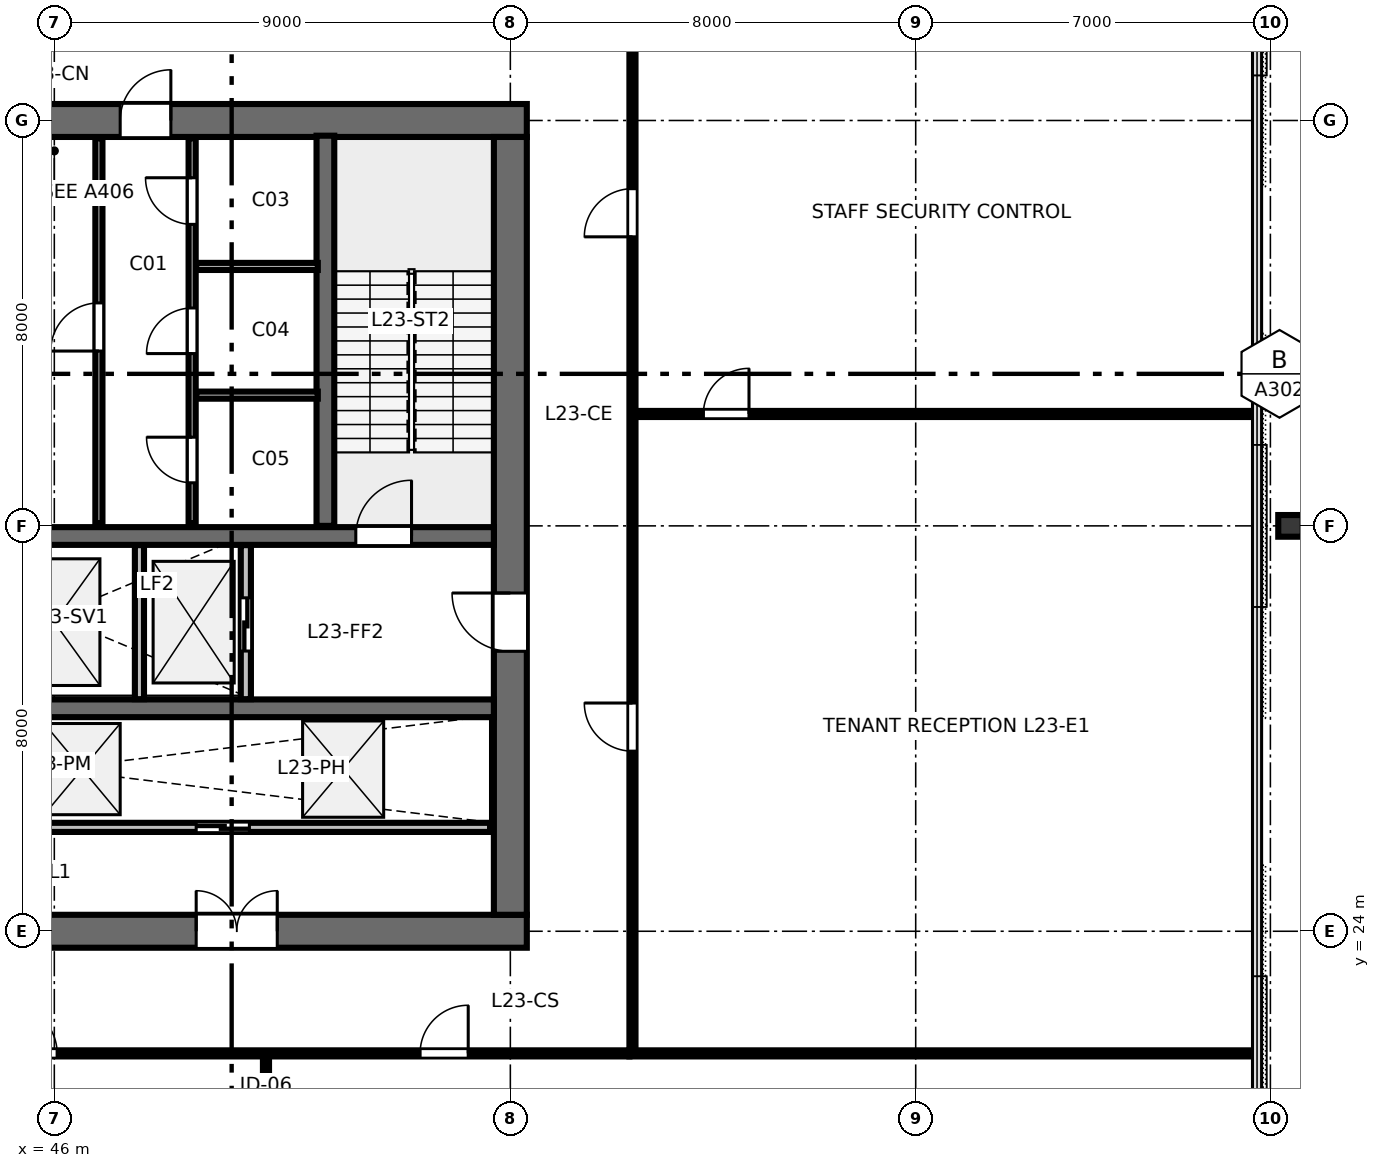
"""IFC4 building model, lengths in metres.
Left out: names, types, materials, properties, quantities, classifications, styles, units other than length and angle.
Written with IfcOpenShell. Run it as: python <this file> out.ifc"""

import sys

from ifc_helpers import new_model, si_unit, direction, frame, frame_2d, origin, origin_2d, place, context, subcontext, project, spatial, rectangle, i_section, extrude, element, fill, save


model = new_model("IFC4")
c1 = context("Model", 3, precision=1e-05, world=origin(), true_north=direction((0.0, 1.0)))
c2 = subcontext(c1, "Body", "Model", "MODEL_VIEW")
j1 = project(units=[si_unit("LENGTHUNIT", "METRE"), si_unit("PLANEANGLEUNIT", "RADIAN")], contexts=[c1])
p1 = place(None, origin())
s1 = spatial("IfcSite", under=j1, at=p1, CompositionType="ELEMENT")
p2 = place(p1, origin())
s2 = spatial("IfcBuilding", under=s1, at=p2, CompositionType="ELEMENT")
p3 = place(p2, frame((0.0, 0.0, 90.4)))
s3 = spatial("IfcBuildingStorey", under=s2, at=p3, CompositionType="ELEMENT", Elevation=90.4)
p4 = place(p3, frame((36.675, 24.0, 0.0), z_axis=(0.0, 0.0, 1.0), x_axis=(1.0, 0.0, 0.0)))
e1 = element("IfcWall", 1, at=p4, inside=s3, PredefinedType="SHEAR", context=c2, shape_type="SweptSolid", body=[
    extrude(rectangle(XDim=18.65, YDim=0.65, at=frame_2d((9.325, 0.0))), origin(), (0.0, 0.0, 1.0), 4.56),
])
p5 = place(p4, frame((5.725, 0.0, 0.0)))
e2 = element("IfcOpeningElement", 2, at=p5, cuts=e1, PredefinedType="OPENING", context=c2, shape_type="SweptSolid", body=[
    extrude(rectangle(XDim=1.6, YDim=2.15, at=frame_2d((0.8, 1.075))), frame((0.0, 0.335, 0.0), z_axis=(0.0, -1.0, 0.0), x_axis=(1.0, 0.0, 0.0)), (0.0, 0.0, 1.0), 0.67),
])
p6 = place(p4, frame((12.125, 0.0, 0.0)))
e3 = element("IfcOpeningElement", 3, at=p6, cuts=e1, PredefinedType="OPENING", context=c2, shape_type="SweptSolid", body=[
    extrude(rectangle(XDim=1.6, YDim=2.15, at=frame_2d((0.8, 1.075))), frame((0.0, 0.335, 0.0), z_axis=(0.0, -1.0, 0.0), x_axis=(1.0, 0.0, 0.0)), (0.0, 0.0, 1.0), 0.67),
])
p7 = place(p3, frame((36.675, 40.0, 0.0), z_axis=(0.0, 0.0, 1.0), x_axis=(1.0, 0.0, 0.0)))
e4 = element("IfcWall", 4, at=p7, inside=s3, PredefinedType="SHEAR", context=c2, shape_type="SweptSolid", body=[
    extrude(rectangle(XDim=18.65, YDim=0.65, at=frame_2d((9.325, 0.0))), origin(), (0.0, 0.0, 1.0), 4.56),
])
p8 = place(p7, frame((10.625, 0.0, 0.0)))
e5 = element("IfcOpeningElement", 5, at=p8, cuts=e4, PredefinedType="OPENING", context=c2, shape_type="SweptSolid", body=[
    extrude(rectangle(XDim=1.0, YDim=2.15, at=frame_2d((0.5, 1.075))), frame((0.0, 0.335, 0.0), z_axis=(0.0, -1.0, 0.0), x_axis=(1.0, 0.0, 0.0)), (0.0, 0.0, 1.0), 0.67),
])
p9 = place(p3, frame((55.0, 24.325, 0.0), z_axis=(0.0, 0.0, 1.0), x_axis=(0.0, 1.0, 0.0)))
e6 = element("IfcWall", 6, at=p9, inside=s3, PredefinedType="SHEAR", context=c2, shape_type="SweptSolid", body=[
    extrude(rectangle(XDim=15.35, YDim=0.65, at=frame_2d((7.675, 0.0))), origin(), (0.0, 0.0, 1.0), 4.56),
])
p10 = place(p9, frame((5.2, 0.0, 0.0)))
e7 = element("IfcOpeningElement", 7, at=p10, cuts=e6, PredefinedType="OPENING", context=c2, shape_type="SweptSolid", body=[
    extrude(rectangle(XDim=1.15, YDim=2.15, at=frame_2d((0.575, 1.075))), frame((0.0, 0.335, 0.0), z_axis=(0.0, -1.0, 0.0), x_axis=(1.0, 0.0, 0.0)), (0.0, 0.0, 1.0), 0.67),
])
p11 = place(p3, frame((37.325, 31.8, 0.0), z_axis=(0.0, 0.0, 1.0), x_axis=(1.0, 0.0, 0.0)))
e8 = element("IfcWall", 8, at=p11, inside=s3, PredefinedType="SHEAR", context=c2, shape_type="SweptSolid", body=[
    extrude(rectangle(XDim=17.35, YDim=0.35, at=frame_2d((8.675, 0.0))), origin(), (0.0, 0.0, 1.0), 4.56),
])
p12 = place(p11, frame((0.725, 0.0, 0.0)))
e9 = element("IfcOpeningElement", 9, at=p12, cuts=e8, PredefinedType="OPENING", context=c2, shape_type="SweptSolid", body=[
    extrude(rectangle(XDim=1.1, YDim=2.15, at=frame_2d((0.55, 1.075))), frame((0.0, 0.185, 0.0), z_axis=(0.0, -1.0, 0.0), x_axis=(1.0, 0.0, 0.0)), (0.0, 0.0, 1.0), 0.37),
])
p13 = place(p11, frame((14.625, 0.0, 0.0)))
e10 = element("IfcOpeningElement", 10, at=p13, cuts=e8, PredefinedType="OPENING", context=c2, shape_type="SweptSolid", body=[
    extrude(rectangle(XDim=1.1, YDim=2.15, at=frame_2d((0.55, 1.075))), frame((0.0, 0.185, 0.0), z_axis=(0.0, -1.0, 0.0), x_axis=(1.0, 0.0, 0.0)), (0.0, 0.0, 1.0), 0.37),
])
p14 = place(p3, frame((37.325, 28.4, 0.0), z_axis=(0.0, 0.0, 1.0), x_axis=(1.0, 0.0, 0.0)))
e11 = element("IfcWall", 11, at=p14, inside=s3, PredefinedType="SHEAR", context=c2, shape_type="SweptSolid", body=[
    extrude(rectangle(XDim=17.35, YDim=0.35, at=frame_2d((8.675, 0.0))), origin(), (0.0, 0.0, 1.0), 4.56),
])
p15 = place(p3, frame((70.397, 32.0, 0.0), z_axis=(-0.047509227082, 0.0, 0.998870799124), x_axis=(0.998870799124, 0.0, 0.047509227082)))
e12 = element("IfcColumn", 12, at=p15, inside=s3, PredefinedType="COLUMN", context=c2, shape_type="SweptSolid", body=[
    extrude(i_section(OverallWidth=0.428, OverallDepth=0.483, WebThickness=0.051, FlangeThickness=0.082, FilletRadius=0.025, at=origin_2d()), origin(), (0.0, 0.0, 1.0), 4.563),
])
p16 = place(p3, frame((51.35, 32.0, 0.0), z_axis=(0.0, 0.0, 1.0), x_axis=(0.0, 1.0, 0.0)))
e13 = element("IfcWall", 13, at=p16, inside=s3, PredefinedType="SHEAR", context=c2, shape_type="SweptSolid", body=[
    extrude(rectangle(XDim=7.7, YDim=0.35, at=frame_2d((3.85, 0.0))), origin(), (0.0, 0.0, 1.0), 4.8),
])
p17 = place(p3, frame((46.88, 32.05, 0.0), z_axis=(0.0, 0.0, 1.0), x_axis=(0.0, 1.0, 0.0)))
e14 = element("IfcWall", 14, at=p17, inside=s3, PredefinedType="PARTITIONING", context=c2, shape_type="SweptSolid", body=[
    extrude(rectangle(XDim=7.6, YDim=0.14, at=frame_2d((3.8, 0.0))), origin(), (0.0, 0.0, 1.0), 4.56),
])
p18 = place(p17, frame((3.4, 0.0, 0.0)))
e15 = element("IfcOpeningElement", 15, at=p18, cuts=e14, PredefinedType="OPENING", context=c2, shape_type="SweptSolid", body=[
    extrude(rectangle(XDim=0.95, YDim=2.15, at=frame_2d((0.475, 1.075))), frame((0.0, 0.08, 0.0), z_axis=(0.0, -1.0, 0.0), x_axis=(1.0, 0.0, 0.0)), (0.0, 0.0, 1.0), 0.16),
])
p19 = place(p3, frame((48.72, 32.05, 0.0), z_axis=(0.0, 0.0, 1.0), x_axis=(0.0, 1.0, 0.0)))
e16 = element("IfcWall", 16, at=p19, inside=s3, PredefinedType="PARTITIONING", context=c2, shape_type="SweptSolid", body=[
    extrude(rectangle(XDim=7.6, YDim=0.14, at=frame_2d((3.8, 0.0))), origin(), (0.0, 0.0, 1.0), 4.56),
])
p20 = place(p19, frame((0.8, 0.0, 0.0)))
e17 = element("IfcOpeningElement", 17, at=p20, cuts=e16, PredefinedType="OPENING", context=c2, shape_type="SweptSolid", body=[
    extrude(rectangle(XDim=0.9, YDim=2.15, at=frame_2d((0.45, 1.075))), frame((0.0, 0.08, 0.0), z_axis=(0.0, -1.0, 0.0), x_axis=(1.0, 0.0, 0.0)), (0.0, 0.0, 1.0), 0.16),
])
p21 = place(p19, frame((3.35, 0.0, 0.0)))
e18 = element("IfcOpeningElement", 18, at=p21, cuts=e16, PredefinedType="OPENING", context=c2, shape_type="SweptSolid", body=[
    extrude(rectangle(XDim=0.9, YDim=2.15, at=frame_2d((0.45, 1.075))), frame((0.0, 0.08, 0.0), z_axis=(0.0, -1.0, 0.0), x_axis=(1.0, 0.0, 0.0)), (0.0, 0.0, 1.0), 0.16),
])
p22 = place(p19, frame((5.9, 0.0, 0.0)))
e19 = element("IfcOpeningElement", 19, at=p22, cuts=e16, PredefinedType="OPENING", context=c2, shape_type="SweptSolid", body=[
    extrude(rectangle(XDim=0.92, YDim=2.15, at=frame_2d((0.46, 1.075))), frame((0.0, 0.08, 0.0), z_axis=(0.0, -1.0, 0.0), x_axis=(1.0, 0.0, 0.0)), (0.0, 0.0, 1.0), 0.16),
])
for number, where, z_axis, x_axis in (
    (20, (48.8, 34.58, 0.0), (0.0, 0.0, 1.0), (1.0, 0.0, 0.0)),
    (21, (48.8, 37.12, 0.0), (0.0, 0.0, 1.0), (1.0, 0.0, 0.0)),
):
    element("IfcWall", number, at=place(p3, frame(where, z_axis=z_axis, x_axis=x_axis)), inside=s3, PredefinedType="PARTITIONING", context=c2, shape_type="SweptSolid", body=[
        extrude(rectangle(XDim=2.4, YDim=0.14, at=frame_2d((1.2, 0.0))), origin(), (0.0, 0.0, 1.0), 4.56),
    ])
p23 = place(p3, frame((49.78, 28.58, 0.0), z_axis=(0.0, 0.0, 1.0), x_axis=(0.0, 1.0, 0.0)))
e22 = element("IfcWall", 22, at=p23, inside=s3, PredefinedType="PARTITIONING", context=c2, shape_type="SweptSolid", body=[
    extrude(rectangle(XDim=3.04, YDim=0.2, at=frame_2d((1.52, 0.0))), origin(), (0.0, 0.0, 1.0), 4.56),
])
p24 = place(p23, frame((0.95, 0.0, 0.0)))
e23 = element("IfcOpeningElement", 23, at=p24, cuts=e22, PredefinedType="OPENING", context=c2, shape_type="SweptSolid", body=[
    extrude(rectangle(XDim=1.05, YDim=2.15, at=frame_2d((0.525, 1.075))), frame((0.0, 0.11, 0.0), z_axis=(0.0, -1.0, 0.0), x_axis=(1.0, 0.0, 0.0)), (0.0, 0.0, 1.0), 0.22),
])
p25 = place(p3, frame((47.68, 28.58, 0.0), z_axis=(0.0, 0.0, 1.0), x_axis=(0.0, 1.0, 0.0)))
e24 = element("IfcWall", 24, at=p25, inside=s3, PredefinedType="PARTITIONING", context=c2, shape_type="SweptSolid", body=[
    extrude(rectangle(XDim=3.04, YDim=0.18, at=frame_2d((1.52, 0.0))), origin(), (0.0, 0.0, 1.0), 4.56),
])
p26 = place(p3, frame((37.4, 26.05, 0.0), z_axis=(0.0, 0.0, 1.0), x_axis=(1.0, 0.0, 0.0)))
e25 = element("IfcWall", 25, at=p26, inside=s3, PredefinedType="PARTITIONING", context=c2, shape_type="SweptSolid", body=[
    extrude(rectangle(XDim=17.2, YDim=0.18, at=frame_2d((8.6, 0.0))), origin(), (0.0, 0.0, 1.0), 4.56),
])
p27 = place(p26, frame((1.1, 0.0, 0.0)))
e26 = element("IfcOpeningElement", 26, at=p27, cuts=e25, PredefinedType="OPENING", context=c2, shape_type="SweptSolid", body=[
    extrude(rectangle(XDim=1.05, YDim=2.15, at=frame_2d((0.525, 1.075))), frame((0.0, 0.1, 0.0), z_axis=(0.0, -1.0, 0.0), x_axis=(1.0, 0.0, 0.0)), (0.0, 0.0, 1.0), 0.2),
])
p28 = place(p26, frame((3.0, 0.0, 0.0)))
e27 = element("IfcOpeningElement", 27, at=p28, cuts=e25, PredefinedType="OPENING", context=c2, shape_type="SweptSolid", body=[
    extrude(rectangle(XDim=1.05, YDim=2.15, at=frame_2d((0.525, 1.075))), frame((0.0, 0.1, 0.0), z_axis=(0.0, -1.0, 0.0), x_axis=(1.0, 0.0, 0.0)), (0.0, 0.0, 1.0), 0.2),
])
p29 = place(p26, frame((11.4, 0.0, 0.0)))
e28 = element("IfcOpeningElement", 28, at=p29, cuts=e25, PredefinedType="OPENING", context=c2, shape_type="SweptSolid", body=[
    extrude(rectangle(XDim=1.05, YDim=2.15, at=frame_2d((0.525, 1.075))), frame((0.0, 0.1, 0.0), z_axis=(0.0, -1.0, 0.0), x_axis=(1.0, 0.0, 0.0)), (0.0, 0.0, 1.0), 0.2),
])
p30 = place(p26, frame((6.2, 0.0, 0.0)))
e29 = element("IfcOpeningElement", 29, at=p30, cuts=e25, PredefinedType="OPENING", context=c2, shape_type="SweptSolid", body=[
    extrude(rectangle(XDim=1.05, YDim=2.15, at=frame_2d((0.525, 1.075))), frame((0.0, 0.1, 0.0), z_axis=(0.0, -1.0, 0.0), x_axis=(1.0, 0.0, 0.0)), (0.0, 0.0, 1.0), 0.2),
])
p31 = place(p3, frame((50.177, 21.59, 0.0), z_axis=(0.0, 0.0, 1.0), x_axis=(0.0, -1.0, 0.0)))
e30 = element("IfcWall", 30, at=p31, inside=s3, PredefinedType="PARTITIONING", context=c2, shape_type="SweptSolid", body=[
    extrude(rectangle(XDim=10.493, YDim=0.12, at=frame_2d((5.247, 0.0))), origin(), (0.0, 0.0, 1.0), 3.84),
])
p32 = place(p31, frame((1.4, 0.0, 0.0)))
e31 = element("IfcOpeningElement", 31, at=p32, cuts=e30, PredefinedType="OPENING", context=c2, shape_type="SweptSolid", body=[
    extrude(rectangle(XDim=0.9, YDim=2.15, at=frame_2d((0.45, 1.075))), frame((0.0, 0.07, 0.0), z_axis=(0.0, -1.0, 0.0), x_axis=(1.0, 0.0, 0.0)), (0.0, 0.0, 1.0), 0.14),
])
p33 = place(p3, frame((34.65, 21.59, 0.0), z_axis=(0.0, 0.0, 1.0), x_axis=(1.0, 0.0, 0.0)))
e32 = element("IfcWall", 32, at=p33, inside=s3, PredefinedType="PARTITIONING", context=c2, shape_type="SweptSolid", body=[
    extrude(rectangle(XDim=22.7, YDim=0.12, at=frame_2d((11.35, 0.0))), origin(), (0.0, 0.0, 1.0), 3.84),
])
p34 = place(p33, frame((2.762, 0.0, 0.0)))
e33 = element("IfcOpeningElement", 33, at=p34, cuts=e32, PredefinedType="OPENING", context=c2, shape_type="SweptSolid", body=[
    extrude(rectangle(XDim=0.95, YDim=2.15, at=frame_2d((0.475, 1.075))), frame((0.0, 0.07, 0.0), z_axis=(0.0, -1.0, 0.0), x_axis=(1.0, 0.0, 0.0)), (0.0, 0.0, 1.0), 0.14),
])
p35 = place(p33, frame((10.456, 0.0, 0.0)))
e34 = element("IfcOpeningElement", 34, at=p35, cuts=e32, PredefinedType="OPENING", context=c2, shape_type="SweptSolid", body=[
    extrude(rectangle(XDim=0.95, YDim=2.15, at=frame_2d((0.475, 1.075))), frame((0.0, 0.07, 0.0), z_axis=(0.0, -1.0, 0.0), x_axis=(1.0, 0.0, 0.0)), (0.0, 0.0, 1.0), 0.14),
])
p36 = place(p33, frame((18.569, 0.0, 0.0)))
e35 = element("IfcOpeningElement", 35, at=p36, cuts=e32, PredefinedType="OPENING", context=c2, shape_type="SweptSolid", body=[
    extrude(rectangle(XDim=0.95, YDim=2.15, at=frame_2d((0.475, 1.075))), frame((0.0, 0.07, 0.0), z_axis=(0.0, -1.0, 0.0), x_axis=(1.0, 0.0, 0.0)), (0.0, 0.0, 1.0), 0.14),
])
p37 = place(p3, frame((57.41, 34.208, 0.0), z_axis=(0.0, 0.0, 1.0), x_axis=(1.0, 0.0, 0.0)))
e36 = element("IfcWall", 36, at=p37, inside=s3, PredefinedType="PARTITIONING", context=c2, shape_type="SweptSolid", body=[
    extrude(rectangle(XDim=12.327, YDim=0.12, at=frame_2d((6.164, 0.0))), origin(), (0.0, 0.0, 1.0), 3.84),
])
p38 = place(p37, frame((1.4, 0.0, 0.0)))
e37 = element("IfcOpeningElement", 37, at=p38, cuts=e36, PredefinedType="OPENING", context=c2, shape_type="SweptSolid", body=[
    extrude(rectangle(XDim=0.9, YDim=2.15, at=frame_2d((0.45, 1.075))), frame((0.0, 0.07, 0.0), z_axis=(0.0, -1.0, 0.0), x_axis=(1.0, 0.0, 0.0)), (0.0, 0.0, 1.0), 0.14),
])
p39 = place(p3, frame((57.41, 21.65, 0.0), z_axis=(0.0, 0.0, 1.0), x_axis=(0.0, 1.0, 0.0)))
e38 = element("IfcWall", 38, at=p39, inside=s3, PredefinedType="PARTITIONING", context=c2, shape_type="SweptSolid", body=[
    extrude(rectangle(XDim=20.7, YDim=0.12, at=frame_2d((10.35, 0.0))), origin(), (0.0, 0.0, 1.0), 3.84),
])
p40 = place(p39, frame((5.904, 0.0, 0.0)))
e39 = element("IfcOpeningElement", 39, at=p40, cuts=e38, PredefinedType="OPENING", context=c2, shape_type="SweptSolid", body=[
    extrude(rectangle(XDim=0.95, YDim=2.15, at=frame_2d((0.475, 1.075))), frame((0.0, 0.07, 0.0), z_axis=(0.0, -1.0, 0.0), x_axis=(1.0, 0.0, 0.0)), (0.0, 0.0, 1.0), 0.14),
])
p41 = place(p39, frame((16.054, 0.0, 0.0)))
e40 = element("IfcOpeningElement", 40, at=p41, cuts=e38, PredefinedType="OPENING", context=c2, shape_type="SweptSolid", body=[
    extrude(rectangle(XDim=0.95, YDim=2.15, at=frame_2d((0.475, 1.075))), frame((0.0, 0.07, 0.0), z_axis=(0.0, -1.0, 0.0), x_axis=(1.0, 0.0, 0.0)), (0.0, 0.0, 1.0), 0.14),
])
p42 = place(p3, frame((57.35, 21.59, 0.0), z_axis=(0.0, 0.0, 1.0), x_axis=(1.0, 0.0, 0.0)))
e41 = element("IfcWall", 41, at=p42, inside=s3, PredefinedType="PARTITIONING", context=c2, shape_type="SweptSolid", body=[
    extrude(rectangle(XDim=12.387, YDim=0.12, at=frame_2d((6.193, 0.0))), origin(), (0.0, 0.0, 1.0), 3.84),
])
p43 = place(p13, origin())
e42 = element("IfcDoor", 42, at=p43, inside=s3, OperationType="SINGLE_SWING_RIGHT", PredefinedType="DOOR", context=c2, shape_type="SweptSolid", body=[
    extrude(rectangle(XDim=1.1, YDim=2.15, at=frame_2d((0.55, 1.075))), frame((0.0, 0.025, 0.0), z_axis=(0.0, -1.0, 0.0), x_axis=(1.0, 0.0, 0.0)), (0.0, 0.0, 1.0), 0.05),
])
fill(e10, e42)
p44 = place(p8, origin())
e43 = element("IfcDoor", 43, at=p44, inside=s3, OperationType="SINGLE_SWING_RIGHT", PredefinedType="DOOR", context=c2, shape_type="SweptSolid", body=[
    extrude(rectangle(XDim=1.0, YDim=2.15, at=frame_2d((0.5, 1.075))), frame((0.0, 0.025, 0.0), z_axis=(0.0, -1.0, 0.0), x_axis=(1.0, 0.0, 0.0)), (0.0, 0.0, 1.0), 0.05),
])
fill(e5, e43)
p45 = place(p10, origin())
e44 = element("IfcDoor", 44, at=p45, inside=s3, OperationType="SINGLE_SWING_RIGHT", PredefinedType="DOOR", context=c2, shape_type="SweptSolid", body=[
    extrude(rectangle(XDim=1.15, YDim=2.15, at=frame_2d((0.575, 1.075))), frame((0.0, 0.025, 0.0), z_axis=(0.0, -1.0, 0.0), x_axis=(1.0, 0.0, 0.0)), (0.0, 0.0, 1.0), 0.05),
])
fill(e7, e44)
p46 = place(p6, origin())
e45 = element("IfcDoor", 45, at=p46, inside=s3, OperationType="DOUBLE_DOOR_SINGLE_SWING", PredefinedType="DOOR", context=c2, shape_type="SweptSolid", body=[
    extrude(rectangle(XDim=1.6, YDim=2.15, at=frame_2d((0.8, 1.075))), frame((0.0, 0.025, 0.0), z_axis=(0.0, -1.0, 0.0), x_axis=(1.0, 0.0, 0.0)), (0.0, 0.0, 1.0), 0.05),
])
fill(e3, e45)
p47 = place(p18, origin())
e46 = element("IfcDoor", 46, at=p47, inside=s3, OperationType="SINGLE_SWING_LEFT", PredefinedType="DOOR", context=c2, shape_type="SweptSolid", body=[
    extrude(rectangle(XDim=0.95, YDim=2.15, at=frame_2d((0.475, 1.075))), frame((0.0, 0.025, 0.0), z_axis=(0.0, -1.0, 0.0), x_axis=(1.0, 0.0, 0.0)), (0.0, 0.0, 1.0), 0.05),
])
fill(e15, e46)
p48 = place(p20, origin())
e47 = element("IfcDoor", 47, at=p48, inside=s3, OperationType="SINGLE_SWING_RIGHT", PredefinedType="DOOR", context=c2, shape_type="SweptSolid", body=[
    extrude(rectangle(XDim=0.9, YDim=2.15, at=frame_2d((0.45, 1.075))), frame((0.0, 0.025, 0.0), z_axis=(0.0, -1.0, 0.0), x_axis=(1.0, 0.0, 0.0)), (0.0, 0.0, 1.0), 0.05),
])
fill(e17, e47)
p49 = place(p21, origin())
e48 = element("IfcDoor", 48, at=p49, inside=s3, OperationType="SINGLE_SWING_LEFT", PredefinedType="DOOR", context=c2, shape_type="SweptSolid", body=[
    extrude(rectangle(XDim=0.9, YDim=2.15, at=frame_2d((0.45, 1.075))), frame((0.0, 0.025, 0.0), z_axis=(0.0, -1.0, 0.0), x_axis=(1.0, 0.0, 0.0)), (0.0, 0.0, 1.0), 0.05),
])
fill(e18, e48)
p50 = place(p22, origin())
e49 = element("IfcDoor", 49, at=p50, inside=s3, OperationType="SINGLE_SWING_RIGHT", PredefinedType="DOOR", context=c2, shape_type="SweptSolid", body=[
    extrude(rectangle(XDim=0.92, YDim=2.15, at=frame_2d((0.46, 1.075))), frame((0.0, 0.025, 0.0), z_axis=(0.0, -1.0, 0.0), x_axis=(1.0, 0.0, 0.0)), (0.0, 0.0, 1.0), 0.05),
])
fill(e19, e49)
p51 = place(p24, origin())
e50 = element("IfcDoor", 50, at=p51, inside=s3, OperationType="SLIDING_TO_RIGHT", PredefinedType="DOOR", context=c2, shape_type="SweptSolid", body=[
    extrude(rectangle(XDim=1.05, YDim=2.15, at=frame_2d((0.525, 1.075))), frame((0.0, 0.025, 0.0), z_axis=(0.0, -1.0, 0.0), x_axis=(1.0, 0.0, 0.0)), (0.0, 0.0, 1.0), 0.05),
])
fill(e23, e50)
p52 = place(p29, origin())
e51 = element("IfcDoor", 51, at=p52, inside=s3, OperationType="SLIDING_TO_LEFT", PredefinedType="DOOR", context=c2, shape_type="SweptSolid", body=[
    extrude(rectangle(XDim=1.05, YDim=2.15, at=frame_2d((0.525, 1.075))), frame((0.0, 0.025, 0.0), z_axis=(0.0, -1.0, 0.0), x_axis=(1.0, 0.0, 0.0)), (0.0, 0.0, 1.0), 0.05),
])
fill(e28, e51)
p53 = place(p35, origin())
e52 = element("IfcDoor", 52, at=p53, inside=s3, OperationType="SINGLE_SWING_LEFT", PredefinedType="DOOR", context=c2, shape_type="SweptSolid", body=[
    extrude(rectangle(XDim=0.95, YDim=2.15, at=frame_2d((0.475, 1.075))), frame((0.0, 0.025, 0.0), z_axis=(0.0, -1.0, 0.0), x_axis=(1.0, 0.0, 0.0)), (0.0, 0.0, 1.0), 0.05),
])
fill(e34, e52)
p54 = place(p36, origin())
e53 = element("IfcDoor", 53, at=p54, inside=s3, OperationType="SINGLE_SWING_RIGHT", PredefinedType="DOOR", context=c2, shape_type="SweptSolid", body=[
    extrude(rectangle(XDim=0.95, YDim=2.15, at=frame_2d((0.475, 1.075))), frame((0.0, 0.025, 0.0), z_axis=(0.0, -1.0, 0.0), x_axis=(1.0, 0.0, 0.0)), (0.0, 0.0, 1.0), 0.05),
])
fill(e35, e53)
p55 = place(p38, origin())
e54 = element("IfcDoor", 54, at=p55, inside=s3, OperationType="SINGLE_SWING_RIGHT", PredefinedType="DOOR", context=c2, shape_type="SweptSolid", body=[
    extrude(rectangle(XDim=0.9, YDim=2.15, at=frame_2d((0.45, 1.075))), frame((0.0, 0.025, 0.0), z_axis=(0.0, -1.0, 0.0), x_axis=(1.0, 0.0, 0.0)), (0.0, 0.0, 1.0), 0.05),
])
fill(e37, e54)
p56 = place(p40, origin())
e55 = element("IfcDoor", 55, at=p56, inside=s3, OperationType="SINGLE_SWING_RIGHT", PredefinedType="DOOR", context=c2, shape_type="SweptSolid", body=[
    extrude(rectangle(XDim=0.95, YDim=2.15, at=frame_2d((0.475, 1.075))), frame((0.0, 0.025, 0.0), z_axis=(0.0, -1.0, 0.0), x_axis=(1.0, 0.0, 0.0)), (0.0, 0.0, 1.0), 0.05),
])
fill(e39, e55)
p57 = place(p41, origin())
e56 = element("IfcDoor", 56, at=p57, inside=s3, OperationType="SINGLE_SWING_LEFT", PredefinedType="DOOR", context=c2, shape_type="SweptSolid", body=[
    extrude(rectangle(XDim=0.95, YDim=2.15, at=frame_2d((0.475, 1.075))), frame((0.0, 0.025, 0.0), z_axis=(0.0, -1.0, 0.0), x_axis=(1.0, 0.0, 0.0)), (0.0, 0.0, 1.0), 0.05),
])
fill(e40, e56)
save(model, sys.argv[1])
